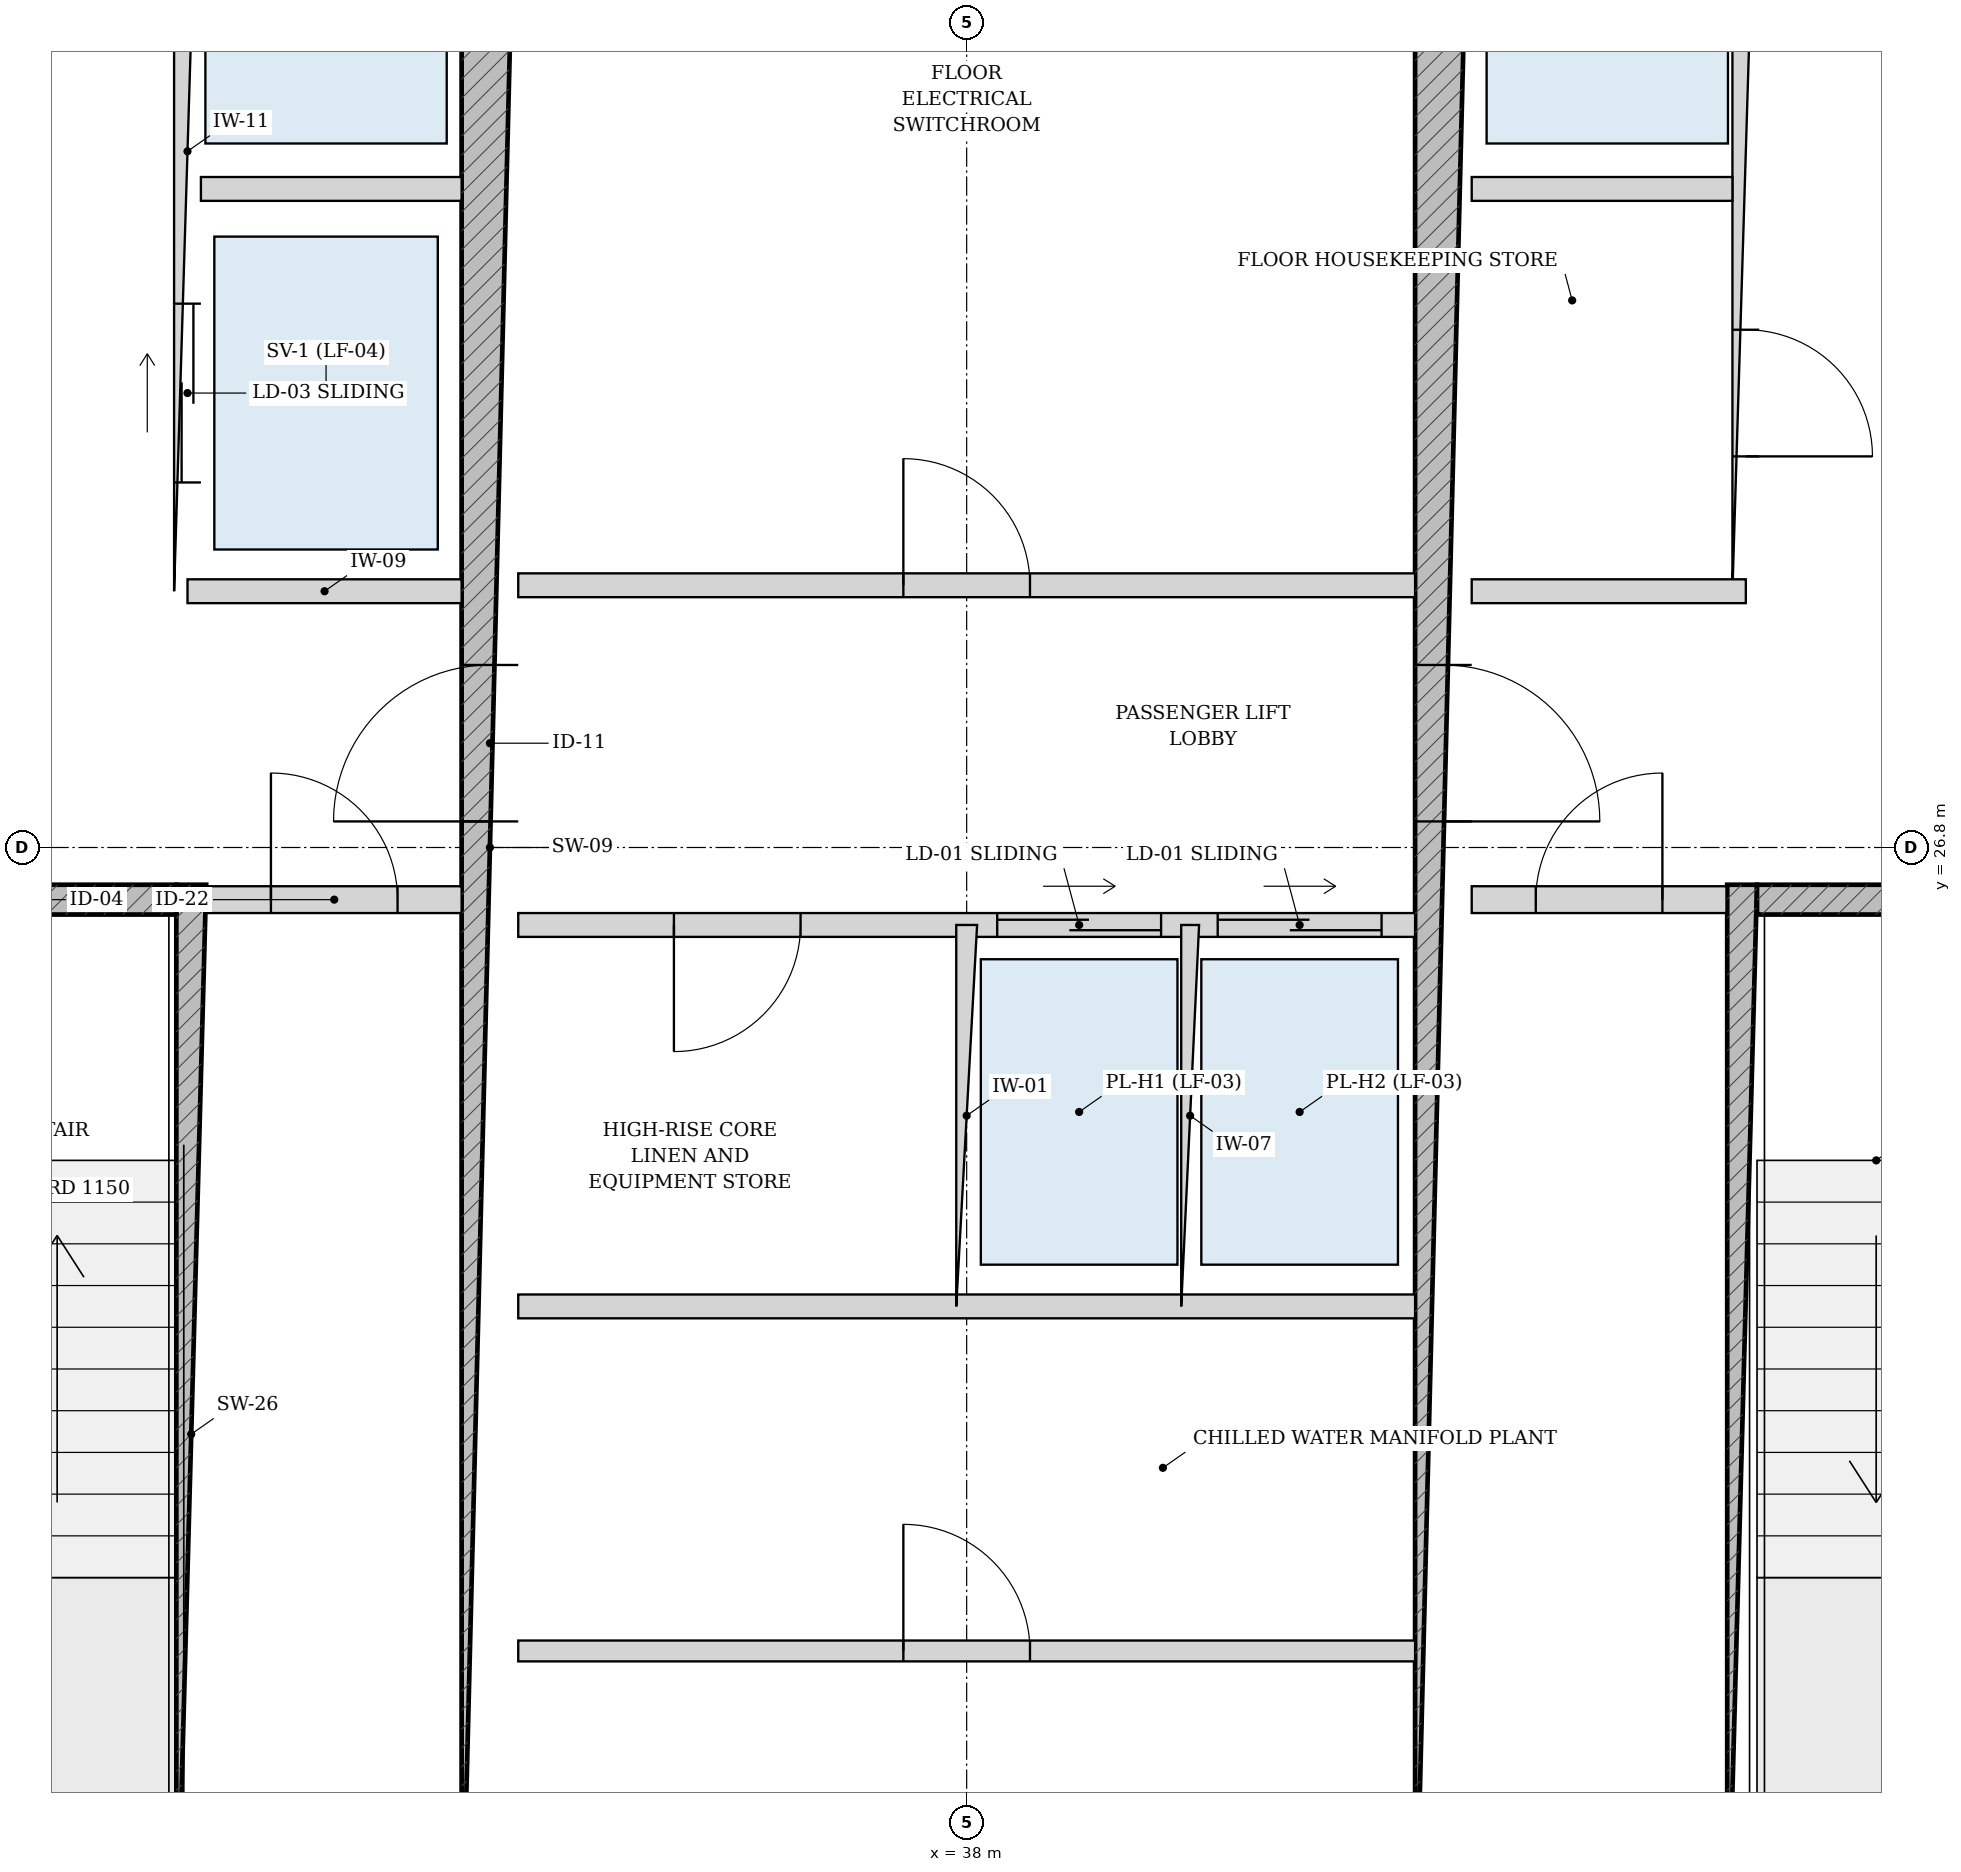
"""IFC4 building model, lengths in metres.
Left out: names, types, materials, properties, quantities, classifications, styles, units other than length and angle.
Written with IfcOpenShell. Run it as: python <this file> out.ifc"""

import sys

from ifc_helpers import new_model, si_unit, direction, frame, frame_2d, origin, place, context, subcontext, project, spatial, rectangle, extrude, source, transform, mapped, element, fill, save


model = new_model("IFC4")
c1 = context("Model", 3, precision=1e-05, world=origin(), true_north=direction((-0.2419218956, 0.970295726276)))
c2 = subcontext(c1, "Body", "Model", "MODEL_VIEW")
j1 = project(units=[si_unit("LENGTHUNIT", "METRE"), si_unit("PLANEANGLEUNIT", "RADIAN")], contexts=[c1])
p1 = place(None, origin())
s1 = spatial("IfcSite", under=j1, at=p1, CompositionType="ELEMENT")
p2 = place(p1, origin())
s2 = spatial("IfcBuilding", under=s1, at=p2, CompositionType="ELEMENT")
p3 = place(p2, frame((0.0, 0.0, 259.45)))
s3 = spatial("IfcBuildingStorey", under=s2, at=p3, CompositionType="ELEMENT", Elevation=259.45)
p4 = place(p3, frame((32.795, 19.175, 0.0), z_axis=(0.0, 0.0, 1.0), x_axis=(0.0, 1.0, 0.0)))
e1 = element("IfcWall", 1, at=p4, inside=s3, PredefinedType="SOLIDWALL", context=c2, shape_type="SweptSolid", body=[
    extrude(rectangle(XDim=7.375, YDim=0.2, at=frame_2d((3.688, 0.0))), origin(), (0.0, 0.0, 1.0), 3.49),
])
p5 = place(p3, frame((29.375, 26.45, 0.0), z_axis=(0.0, 0.0, 1.0), x_axis=(1.0, 0.0, 0.0)))
e2 = element("IfcWall", 2, at=p5, inside=s3, PredefinedType="SOLIDWALL", context=c2, shape_type="SweptSolid", body=[
    extrude(rectangle(XDim=3.32, YDim=0.2, at=frame_2d((1.66, 0.0))), origin(), (0.0, 0.0, 1.0), 3.49),
])
p6 = place(p5, frame((1.185, 0.0, 0.0)))
e3 = element("IfcOpeningElement", 3, at=p6, cuts=e2, PredefinedType="OPENING", context=c2, shape_type="SweptSolid", body=[
    extrude(rectangle(XDim=0.95, YDim=2.15, at=frame_2d((0.475, 1.075))), frame((0.0, 0.11, 0.0), z_axis=(0.0, -1.0, 0.0), x_axis=(1.0, 0.0, 0.0)), (0.0, 0.0, 1.0), 0.22),
])
p7 = place(p3, frame((43.205, 19.175, 0.0), z_axis=(0.0, 0.0, 1.0), x_axis=(0.0, 1.0, 0.0)))
e4 = element("IfcWall", 4, at=p7, inside=s3, PredefinedType="SOLIDWALL", context=c2, shape_type="SweptSolid", body=[
    extrude(rectangle(XDim=7.375, YDim=0.2, at=frame_2d((3.688, 0.0))), origin(), (0.0, 0.0, 1.0), 3.49),
])
p8 = place(p3, frame((43.305, 26.45, 0.0), z_axis=(0.0, 0.0, 1.0), x_axis=(1.0, 0.0, 0.0)))
e5 = element("IfcWall", 5, at=p8, inside=s3, PredefinedType="SOLIDWALL", context=c2, shape_type="SweptSolid", body=[
    extrude(rectangle(XDim=3.32, YDim=0.2, at=frame_2d((1.66, 0.0))), origin(), (0.0, 0.0, 1.0), 3.49),
])
p9 = place(p8, frame((1.185, 0.0, 0.0)))
e6 = element("IfcOpeningElement", 6, at=p9, cuts=e5, PredefinedType="OPENING", context=c2, shape_type="SweptSolid", body=[
    extrude(rectangle(XDim=0.95, YDim=2.15, at=frame_2d((0.475, 1.075))), frame((0.0, 0.11, 0.0), z_axis=(0.0, -1.0, 0.0), x_axis=(1.0, 0.0, 0.0)), (0.0, 0.0, 1.0), 0.22),
])
p10 = place(p3, frame((34.8, 19.175, 0.0), z_axis=(0.0, 0.0, 1.0), x_axis=(0.0, 1.0, 0.0)))
e7 = element("IfcWall", 7, at=p10, inside=s3, PredefinedType="SHEAR", context=c2, shape_type="SweptSolid", body=[
    extrude(rectangle(XDim=15.25, YDim=0.38, at=frame_2d((7.625, 0.0))), origin(), (0.0, 0.0, 1.0), 3.49),
])
p11 = place(p10, frame((7.8, 0.0, 0.0)))
e8 = element("IfcOpeningElement", 8, at=p11, cuts=e7, PredefinedType="OPENING", context=c2, shape_type="SweptSolid", body=[
    extrude(rectangle(XDim=1.05, YDim=2.15, at=frame_2d((0.525, 1.075))), frame((0.0, 0.2, 0.0), z_axis=(0.0, -1.0, 0.0), x_axis=(1.0, 0.0, 0.0)), (0.0, 0.0, 1.0), 0.4),
])
p12 = place(p3, frame((41.2, 19.175, 0.0), z_axis=(0.0, 0.0, 1.0), x_axis=(0.0, 1.0, 0.0)))
e9 = element("IfcWall", 9, at=p12, inside=s3, PredefinedType="SHEAR", context=c2, shape_type="SweptSolid", body=[
    extrude(rectangle(XDim=15.25, YDim=0.38, at=frame_2d((7.625, 0.0))), origin(), (0.0, 0.0, 1.0), 3.49),
])
p13 = place(p12, frame((7.8, 0.0, 0.0)))
e10 = element("IfcOpeningElement", 10, at=p13, cuts=e9, PredefinedType="OPENING", context=c2, shape_type="SweptSolid", body=[
    extrude(rectangle(XDim=1.05, YDim=2.15, at=frame_2d((0.525, 1.075))), frame((0.0, 0.2, 0.0), z_axis=(0.0, -1.0, 0.0), x_axis=(1.0, 0.0, 0.0)), (0.0, 0.0, 1.0), 0.4),
])
p14 = place(p3, frame((32.9, 26.45, 0.0), z_axis=(0.0, 0.0, 1.0), x_axis=(1.0, 0.0, 0.0)))
e11 = element("IfcWall", 11, at=p14, inside=s3, PredefinedType="PARTITIONING", context=c2, shape_type="SweptSolid", body=[
    extrude(rectangle(XDim=1.71, YDim=0.18, at=frame_2d((0.855, 0.0))), origin(), (0.0, 0.0, 1.0), 3.49),
])
p15 = place(p14, frame((0.43, 0.0, 0.0)))
e12 = element("IfcOpeningElement", 12, at=p15, cuts=e11, PredefinedType="OPENING", context=c2, shape_type="SweptSolid", body=[
    extrude(rectangle(XDim=0.85, YDim=2.1, at=frame_2d((0.425, 1.05))), frame((0.0, 0.1, 0.0), z_axis=(0.0, -1.0, 0.0), x_axis=(1.0, 0.0, 0.0)), (0.0, 0.0, 1.0), 0.2),
])
p16 = place(p3, frame((41.39, 26.45, 0.0), z_axis=(0.0, 0.0, 1.0), x_axis=(1.0, 0.0, 0.0)))
e13 = element("IfcWall", 13, at=p16, inside=s3, PredefinedType="PARTITIONING", context=c2, shape_type="SweptSolid", body=[
    extrude(rectangle(XDim=1.71, YDim=0.18, at=frame_2d((0.855, 0.0))), origin(), (0.0, 0.0, 1.0), 3.49),
])
p17 = place(p16, frame((0.43, 0.0, 0.0)))
e14 = element("IfcOpeningElement", 14, at=p17, cuts=e13, PredefinedType="OPENING", context=c2, shape_type="SweptSolid", body=[
    extrude(rectangle(XDim=0.85, YDim=2.1, at=frame_2d((0.425, 1.05))), frame((0.0, 0.1, 0.0), z_axis=(0.0, -1.0, 0.0), x_axis=(1.0, 0.0, 0.0)), (0.0, 0.0, 1.0), 0.2),
])
p18 = place(p3, frame((32.77, 28.52, 0.0), z_axis=(0.0, 0.0, 1.0), x_axis=(0.0, 1.0, 0.0)))
e15 = element("IfcWall", 15, at=p18, inside=s3, PredefinedType="PARTITIONING", context=c2, shape_type="SweptSolid", body=[
    extrude(rectangle(XDim=5.905, YDim=0.18, at=frame_2d((2.953, 0.0))), origin(), (0.0, 0.0, 1.0), 3.49),
])
p19 = place(p18, frame((3.655, 0.0, 0.0)))
e16 = element("IfcOpeningElement", 16, at=p19, cuts=e15, PredefinedType="OPENING", context=c2, shape_type="SweptSolid", body=[
    extrude(rectangle(XDim=1.15, YDim=2.2, at=frame_2d((0.575, 1.1))), frame((0.0, 0.1, 0.0), z_axis=(0.0, -1.0, 0.0), x_axis=(1.0, 0.0, 0.0)), (0.0, 0.0, 1.0), 0.2),
])
p20 = place(p18, frame((0.73, 0.0, 0.0)))
e17 = element("IfcOpeningElement", 17, at=p20, cuts=e15, PredefinedType="OPENING", context=c2, shape_type="SweptSolid", body=[
    extrude(rectangle(XDim=1.2, YDim=2.25, at=frame_2d((0.6, 1.125))), frame((0.0, 0.1, 0.0), z_axis=(0.0, -1.0, 0.0), x_axis=(1.0, 0.0, 0.0)), (0.0, 0.0, 1.0), 0.2),
])
p21 = place(p3, frame((32.86, 31.22, 0.0), z_axis=(0.0, 0.0, 1.0), x_axis=(1.0, 0.0, 0.0)))
e18 = element("IfcWall", 18, at=p21, inside=s3, PredefinedType="PARTITIONING", context=c2, shape_type="SweptSolid", body=[
    extrude(rectangle(XDim=1.75, YDim=0.16, at=frame_2d((0.875, 0.0))), origin(), (0.0, 0.0, 1.0), 3.49),
])
p22 = place(p3, frame((32.77, 28.52, 0.0), z_axis=(0.0, 0.0, 1.0), x_axis=(1.0, 0.0, 0.0)))
e19 = element("IfcWall", 19, at=p22, inside=s3, PredefinedType="PARTITIONING", context=c2, shape_type="SweptSolid", body=[
    extrude(rectangle(XDim=1.84, YDim=0.16, at=frame_2d((0.92, 0.0))), origin(), (0.0, 0.0, 1.0), 3.49),
])
p23 = place(p3, frame((43.23, 28.52, 0.0), z_axis=(0.0, 0.0, 1.0), x_axis=(0.0, 1.0, 0.0)))
e20 = element("IfcWall", 20, at=p23, inside=s3, PredefinedType="PARTITIONING", context=c2, shape_type="SweptSolid", body=[
    extrude(rectangle(XDim=5.905, YDim=0.18, at=frame_2d((2.953, 0.0))), origin(), (0.0, 0.0, 1.0), 3.49),
])
p24 = place(p23, frame((0.905, 0.0, 0.0)))
e21 = element("IfcOpeningElement", 21, at=p24, cuts=e20, PredefinedType="OPENING", context=c2, shape_type="SweptSolid", body=[
    extrude(rectangle(XDim=0.85, YDim=2.1, at=frame_2d((0.425, 1.05))), frame((0.0, 0.1, 0.0), z_axis=(0.0, -1.0, 0.0), x_axis=(1.0, 0.0, 0.0)), (0.0, 0.0, 1.0), 0.2),
])
p25 = place(p23, frame((3.655, 0.0, 0.0)))
e22 = element("IfcOpeningElement", 22, at=p25, cuts=e20, PredefinedType="OPENING", context=c2, shape_type="SweptSolid", body=[
    extrude(rectangle(XDim=1.15, YDim=2.2, at=frame_2d((0.575, 1.1))), frame((0.0, 0.1, 0.0), z_axis=(0.0, -1.0, 0.0), x_axis=(1.0, 0.0, 0.0)), (0.0, 0.0, 1.0), 0.2),
])
p26 = place(p3, frame((41.39, 31.22, 0.0), z_axis=(0.0, 0.0, 1.0), x_axis=(1.0, 0.0, 0.0)))
e23 = element("IfcWall", 23, at=p26, inside=s3, PredefinedType="PARTITIONING", context=c2, shape_type="SweptSolid", body=[
    extrude(rectangle(XDim=1.75, YDim=0.16, at=frame_2d((0.875, 0.0))), origin(), (0.0, 0.0, 1.0), 3.49),
])
p27 = place(p3, frame((41.39, 28.52, 0.0), z_axis=(0.0, 0.0, 1.0), x_axis=(1.0, 0.0, 0.0)))
e24 = element("IfcWall", 24, at=p27, inside=s3, PredefinedType="PARTITIONING", context=c2, shape_type="SweptSolid", body=[
    extrude(rectangle(XDim=1.84, YDim=0.16, at=frame_2d((0.92, 0.0))), origin(), (0.0, 0.0, 1.0), 3.49),
])
p28 = place(p3, frame((34.99, 28.56, 0.0), z_axis=(0.0, 0.0, 1.0), x_axis=(1.0, 0.0, 0.0)))
e25 = element("IfcWall", 25, at=p28, inside=s3, PredefinedType="PARTITIONING", context=c2, shape_type="SweptSolid", body=[
    extrude(rectangle(XDim=6.02, YDim=0.16, at=frame_2d((3.01, 0.0))), origin(), (0.0, 0.0, 1.0), 3.49),
])
p29 = place(p28, frame((2.585, 0.0, 0.0)))
e26 = element("IfcOpeningElement", 26, at=p29, cuts=e25, PredefinedType="OPENING", context=c2, shape_type="SweptSolid", body=[
    extrude(rectangle(XDim=0.85, YDim=2.1, at=frame_2d((0.425, 1.05))), frame((0.0, 0.09, 0.0), z_axis=(0.0, -1.0, 0.0), x_axis=(1.0, 0.0, 0.0)), (0.0, 0.0, 1.0), 0.18),
])
p30 = place(p3, frame((34.99, 26.28, 0.0), z_axis=(0.0, 0.0, 1.0), x_axis=(1.0, 0.0, 0.0)))
e27 = element("IfcWall", 27, at=p30, inside=s3, PredefinedType="PARTITIONING", context=c2, shape_type="SweptSolid", body=[
    extrude(rectangle(XDim=6.02, YDim=0.16, at=frame_2d((3.01, 0.0))), origin(), (0.0, 0.0, 1.0), 3.49),
])
p31 = place(p30, frame((1.045, 0.0, 0.0)))
e28 = element("IfcOpeningElement", 28, at=p31, cuts=e27, PredefinedType="OPENING", context=c2, shape_type="SweptSolid", body=[
    extrude(rectangle(XDim=0.85, YDim=2.1, at=frame_2d((0.425, 1.05))), frame((0.0, 0.09, 0.0), z_axis=(0.0, -1.0, 0.0), x_axis=(1.0, 0.0, 0.0)), (0.0, 0.0, 1.0), 0.18),
])
p32 = place(p30, frame((3.215, 0.0, 0.0)))
e29 = element("IfcOpeningElement", 29, at=p32, cuts=e27, PredefinedType="OPENING", context=c2, shape_type="SweptSolid", body=[
    extrude(rectangle(XDim=1.1, YDim=2.2, at=frame_2d((0.55, 1.1))), frame((0.0, 0.09, 0.0), z_axis=(0.0, -1.0, 0.0), x_axis=(1.0, 0.0, 0.0)), (0.0, 0.0, 1.0), 0.18),
])
p33 = place(p30, frame((4.695, 0.0, 0.0)))
e30 = element("IfcOpeningElement", 30, at=p33, cuts=e27, PredefinedType="OPENING", context=c2, shape_type="SweptSolid", body=[
    extrude(rectangle(XDim=1.1, YDim=2.2, at=frame_2d((0.55, 1.1))), frame((0.0, 0.09, 0.0), z_axis=(0.0, -1.0, 0.0), x_axis=(1.0, 0.0, 0.0)), (0.0, 0.0, 1.0), 0.18),
])
p34 = place(p3, frame((34.99, 23.72, 0.0), z_axis=(0.0, 0.0, 1.0), x_axis=(1.0, 0.0, 0.0)))
e31 = element("IfcWall", 31, at=p34, inside=s3, PredefinedType="PARTITIONING", context=c2, shape_type="SweptSolid", body=[
    extrude(rectangle(XDim=6.02, YDim=0.16, at=frame_2d((3.01, 0.0))), origin(), (0.0, 0.0, 1.0), 3.49),
])
p35 = place(p3, frame((38.0, 23.72, 0.0), z_axis=(0.0, 0.0, 1.0), x_axis=(0.0, 1.0, 0.0)))
e32 = element("IfcWall", 32, at=p35, inside=s3, PredefinedType="PARTITIONING", context=c2, shape_type="SweptSolid", body=[
    extrude(rectangle(XDim=2.56, YDim=0.14, at=frame_2d((1.28, 0.0))), origin(), (0.0, 0.0, 1.0), 3.49),
])
p36 = place(p3, frame((39.5, 23.72, 0.0), z_axis=(0.0, 0.0, 1.0), x_axis=(0.0, 1.0, 0.0)))
e33 = element("IfcWall", 33, at=p36, inside=s3, PredefinedType="PARTITIONING", context=c2, shape_type="SweptSolid", body=[
    extrude(rectangle(XDim=2.56, YDim=0.12, at=frame_2d((1.28, 0.0))), origin(), (0.0, 0.0, 1.0), 3.49),
])
p37 = place(p3, frame((34.99, 21.407, 0.0), z_axis=(0.0, 0.0, 1.0), x_axis=(1.0, 0.0, 0.0)))
e34 = element("IfcWall", 34, at=p37, inside=s3, PredefinedType="PARTITIONING", context=c2, shape_type="SweptSolid", body=[
    extrude(rectangle(XDim=6.02, YDim=0.14, at=frame_2d((3.01, 0.0))), origin(), (0.0, 0.0, 1.0), 3.49),
])
p38 = place(p37, frame((2.585, 0.0, 0.0)))
e35 = element("IfcOpeningElement", 35, at=p38, cuts=e34, PredefinedType="OPENING", context=c2, shape_type="SweptSolid", body=[
    extrude(rectangle(XDim=0.85, YDim=2.1, at=frame_2d((0.425, 1.05))), frame((0.0, 0.08, 0.0), z_axis=(0.0, -1.0, 0.0), x_axis=(1.0, 0.0, 0.0)), (0.0, 0.0, 1.0), 0.16),
])
m1 = source(origin(), c2, "Body", "SweptSolid", [
    extrude(rectangle(XDim=1.05, YDim=2.15, at=frame_2d((0.525, 1.075))), frame((0.0, 0.025, 0.0), z_axis=(0.0, -1.0, 0.0), x_axis=(1.0, 0.0, 0.0)), (0.0, 0.0, 1.0), 0.05),
])
p39 = place(p11, origin())
e36 = element("IfcDoor", 36, at=p39, inside=s3, OperationType="SINGLE_SWING_LEFT", PredefinedType="DOOR", context=c2, shape_type="MappedRepresentation", body=[
    mapped(m1, transform((0.0, 0.0, 0.0), scale=1.0)),
])
fill(e8, e36)
p40 = place(p13, frame((1.05, 0.0, 0.0), z_axis=(0.0, 0.0, 1.0), x_axis=(-1.0, 0.0, 0.0)))
e37 = element("IfcDoor", 37, at=p40, inside=s3, OperationType="SINGLE_SWING_RIGHT", PredefinedType="DOOR", context=c2, shape_type="MappedRepresentation", body=[
    mapped(m1, transform((0.0, 0.0, 0.0), scale=1.0)),
])
fill(e10, e37)
m2 = source(origin(), c2, "Body", "SweptSolid", [
    extrude(rectangle(XDim=0.85, YDim=2.1, at=frame_2d((0.425, 1.05))), frame((0.0, 0.025, 0.0), z_axis=(0.0, -1.0, 0.0), x_axis=(1.0, 0.0, 0.0)), (0.0, 0.0, 1.0), 0.05),
])
p41 = place(p15, origin())
e38 = element("IfcDoor", 38, at=p41, inside=s3, OperationType="SINGLE_SWING_LEFT", PredefinedType="DOOR", context=c2, shape_type="MappedRepresentation", body=[
    mapped(m2, transform((0.0, 0.0, 0.0), scale=1.0)),
])
fill(e12, e38)
p42 = place(p17, origin())
e39 = element("IfcDoor", 39, at=p42, inside=s3, OperationType="SINGLE_SWING_RIGHT", PredefinedType="DOOR", context=c2, shape_type="MappedRepresentation", body=[
    mapped(m2, transform((0.0, 0.0, 0.0), scale=1.0)),
])
fill(e14, e39)
p43 = place(p24, frame((0.85, 0.0, 0.0), z_axis=(0.0, 0.0, 1.0), x_axis=(-1.0, 0.0, 0.0)))
e40 = element("IfcDoor", 40, at=p43, inside=s3, OperationType="SINGLE_SWING_RIGHT", PredefinedType="DOOR", context=c2, shape_type="MappedRepresentation", body=[
    mapped(m2, transform((0.0, 0.0, 0.0), scale=1.0)),
])
fill(e21, e40)
p44 = place(p29, origin())
e41 = element("IfcDoor", 41, at=p44, inside=s3, OperationType="SINGLE_SWING_LEFT", PredefinedType="DOOR", context=c2, shape_type="MappedRepresentation", body=[
    mapped(m2, transform((0.0, 0.0, 0.0), scale=1.0)),
])
fill(e26, e41)
p45 = place(p31, frame((0.85, 0.0, 0.0), z_axis=(0.0, 0.0, 1.0), x_axis=(-1.0, 0.0, 0.0)))
e42 = element("IfcDoor", 42, at=p45, inside=s3, OperationType="SINGLE_SWING_RIGHT", PredefinedType="DOOR", context=c2, shape_type="MappedRepresentation", body=[
    mapped(m2, transform((0.0, 0.0, 0.0), scale=1.0)),
])
fill(e28, e42)
p46 = place(p38, origin())
e43 = element("IfcDoor", 43, at=p46, inside=s3, OperationType="SINGLE_SWING_LEFT", PredefinedType="DOOR", context=c2, shape_type="MappedRepresentation", body=[
    mapped(m2, transform((0.0, 0.0, 0.0), scale=1.0)),
])
fill(e35, e43)
m3 = source(origin(), c2, "Body", "SweptSolid", [
    extrude(rectangle(XDim=1.2, YDim=2.25, at=frame_2d((0.6, 1.125))), frame((0.0, 0.025, 0.0), z_axis=(0.0, -1.0, 0.0), x_axis=(1.0, 0.0, 0.0)), (0.0, 0.0, 1.0), 0.05),
])
p47 = place(p20, origin())
e44 = element("IfcDoor", 44, at=p47, inside=s3, OperationType="DOUBLE_DOOR_SLIDING", PredefinedType="DOOR", context=c2, shape_type="MappedRepresentation", body=[
    mapped(m3, transform((0.0, 0.0, 0.0), scale=1.0)),
])
fill(e17, e44)
m4 = source(origin(), c2, "Body", "SweptSolid", [
    extrude(rectangle(XDim=1.1, YDim=2.2, at=frame_2d((0.55, 1.1))), frame((0.0, 0.025, 0.0), z_axis=(0.0, -1.0, 0.0), x_axis=(1.0, 0.0, 0.0)), (0.0, 0.0, 1.0), 0.05),
])
p48 = place(p32, origin())
e45 = element("IfcDoor", 45, at=p48, inside=s3, OperationType="DOUBLE_DOOR_SLIDING", PredefinedType="DOOR", context=c2, shape_type="MappedRepresentation", body=[
    mapped(m4, transform((0.0, 0.0, 0.0), scale=1.0)),
])
fill(e29, e45)
p49 = place(p33, origin())
e46 = element("IfcDoor", 46, at=p49, inside=s3, OperationType="DOUBLE_DOOR_SLIDING", PredefinedType="DOOR", context=c2, shape_type="MappedRepresentation", body=[
    mapped(m4, transform((0.0, 0.0, 0.0), scale=1.0)),
])
fill(e30, e46)
save(model, sys.argv[1])
